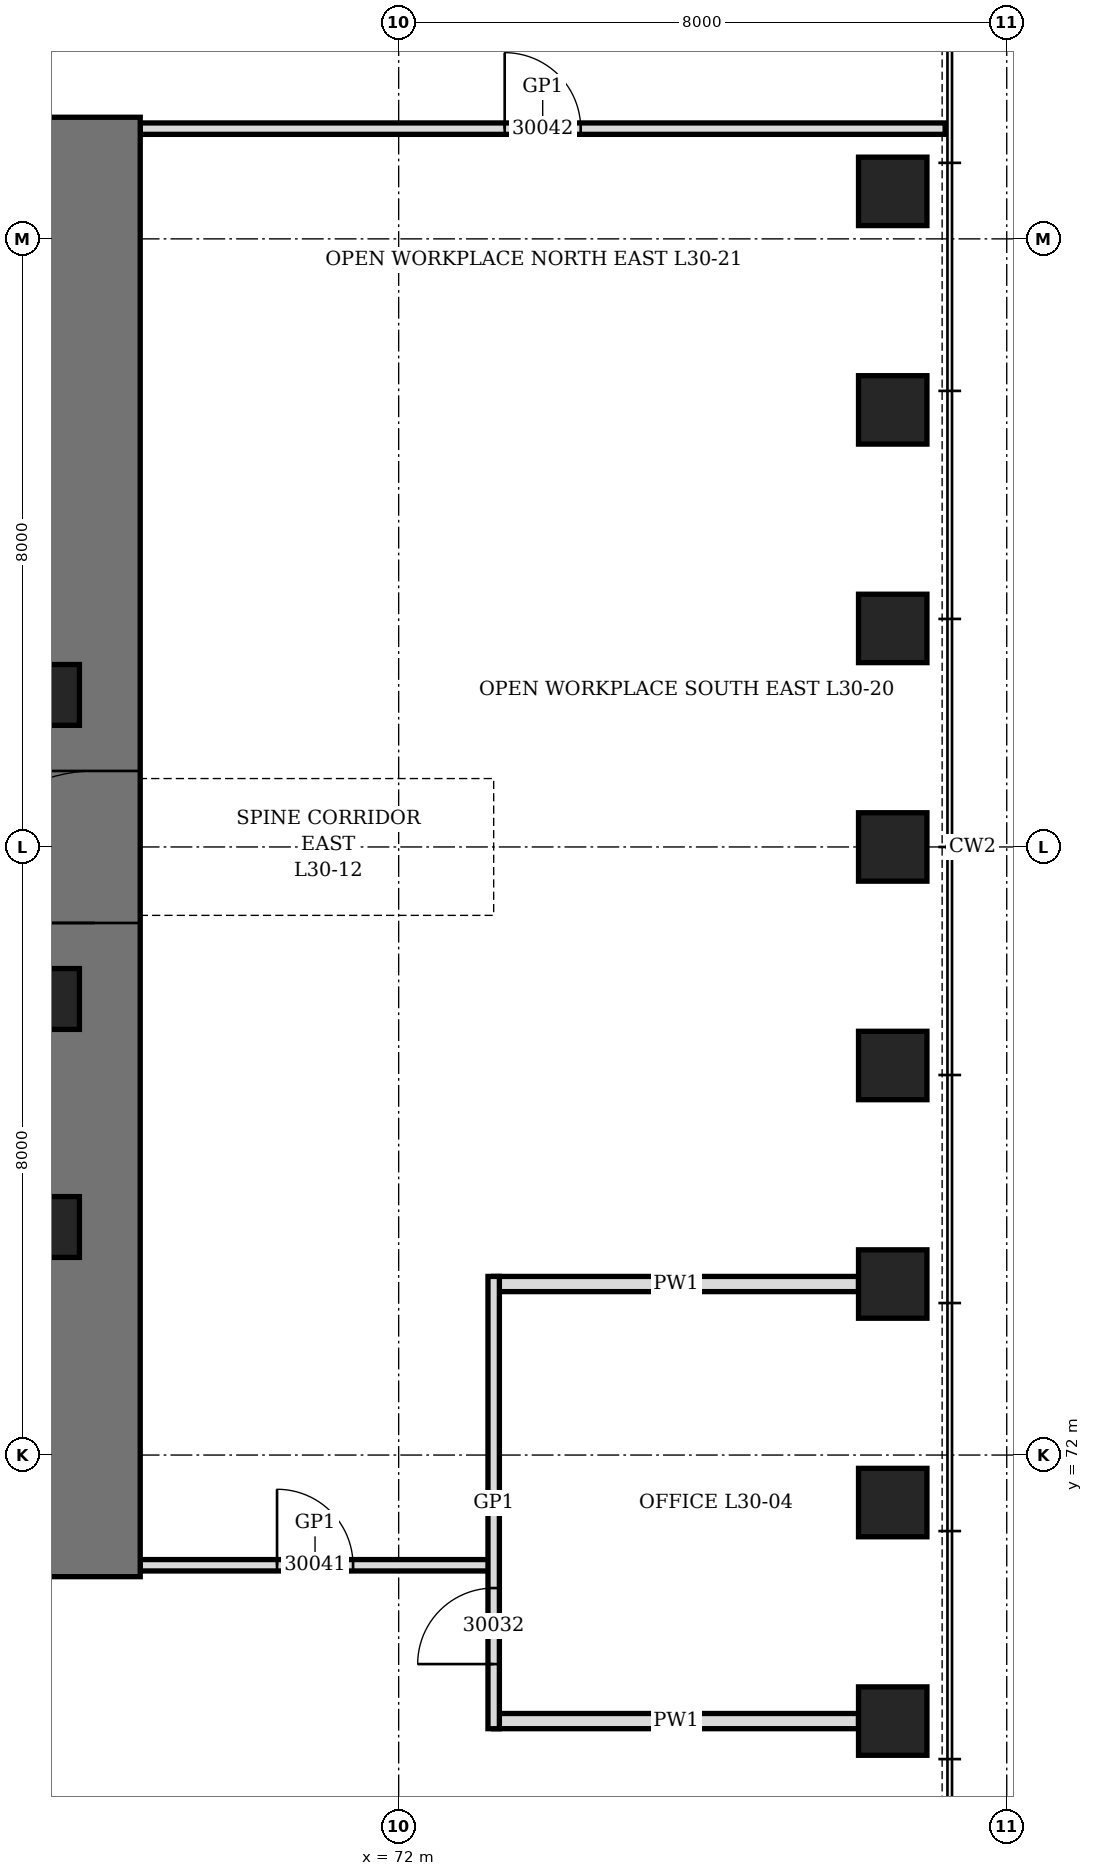
"""IFC4 building model, lengths in metres.
Left out: names, types, materials, properties, quantities, classifications, styles, units other than length and angle.
Written with IfcOpenShell. Run it as: python <this file> out.ifc"""

import sys

from ifc_helpers import new_model, si_unit, direction, frame, frame_2d, origin, origin_2d, place, context, subcontext, project, spatial, rectangle, hollow_rectangle, extrude, element, fill, save


model = new_model("IFC4")
c1 = context("Model", 3, precision=1e-05, world=origin(), true_north=direction((0.0, 1.0)))
c2 = subcontext(c1, "Body", "Model", "MODEL_VIEW")
j1 = project(units=[si_unit("LENGTHUNIT", "METRE"), si_unit("PLANEANGLEUNIT", "RADIAN")], contexts=[c1])
p1 = place(None, origin())
s1 = spatial("IfcSite", under=j1, at=p1, CompositionType="ELEMENT")
p2 = place(p1, origin())
s2 = spatial("IfcBuilding", under=s1, at=p2, CompositionType="ELEMENT")
p3 = place(p2, frame((0.0, 0.0, 137.5)))
s3 = spatial("IfcBuildingStorey", under=s2, at=p3, CompositionType="ELEMENT", Elevation=137.5)
for number, where, z_axis, x_axis in (
    (1, (78.5, 68.5, 0.0), (0.0, 0.0, 1.0), (0.0, 1.0, 0.0)),
    (2, (78.5, 71.375, 0.0), (0.0, 0.0, 1.0), (0.0, 1.0, 0.0)),
    (3, (78.5, 74.25, 0.0), (0.0, 0.0, 1.0), (0.0, 1.0, 0.0)),
    (4, (78.5, 77.125, 0.0), (0.0, 0.0, 1.0), (0.0, 1.0, 0.0)),
    (5, (78.5, 80.0, 0.0), (0.0, 0.0, 1.0), (0.0, 1.0, 0.0)),
    (6, (78.5, 82.875, 0.0), (0.0, 0.0, 1.0), (0.0, 1.0, 0.0)),
    (7, (78.5, 85.75, 0.0), (0.0, 0.0, 1.0), (0.0, 1.0, 0.0)),
    (8, (78.5, 88.625, 0.0), (0.0, 0.0, 1.0), (0.0, 1.0, 0.0)),
):
    element("IfcColumn", number, at=place(p3, frame(where, z_axis=z_axis, x_axis=x_axis)), inside=s3, PredefinedType="COLUMN", context=c2, shape_type="SweptSolid", body=[
        extrude(hollow_rectangle(XDim=0.9, YDim=0.9, WallThickness=0.15, at=origin_2d()), origin(), (0.0, 0.0, 1.0), 4.2),
    ])
p4 = place(p3, frame((68.0, 70.4, 0.0), z_axis=(0.0, 0.0, 1.0), x_axis=(0.0, 1.0, 0.0)))
e9 = element("IfcWall", 9, at=p4, inside=s3, PredefinedType="SHEAR", context=c2, shape_type="SweptSolid", body=[
    extrude(rectangle(XDim=19.2, YDim=1.2, at=frame_2d((9.6, 0.0))), origin(), (0.0, 0.0, 1.0), 4.2),
])
p5 = place(p4, frame((8.6, 0.0, 0.0)))
e10 = element("IfcOpeningElement", 10, at=p5, cuts=e9, PredefinedType="OPENING", context=c2, shape_type="SweptSolid", body=[
    extrude(rectangle(XDim=2.0, YDim=2.4, at=frame_2d((1.0, 1.2))), frame((0.0, 0.61, 0.0), z_axis=(0.0, -1.0, 0.0), x_axis=(1.0, 0.0, 0.0)), (0.0, 0.0, 1.0), 1.22),
])
for number, where, z_axis, x_axis in (
    (11, (67.4, 75.0, 0.0), (0.0, 0.0, 1.0), (1.0, 0.0, 0.0)),
    (12, (67.4, 78.0, 0.0), (0.0, 0.0, 1.0), (1.0, 0.0, 0.0)),
    (13, (67.4, 82.0, 0.0), (0.0, 0.0, 1.0), (1.0, 0.0, 0.0)),
):
    element("IfcColumn", number, at=place(p3, frame(where, z_axis=z_axis, x_axis=x_axis)), inside=s3, PredefinedType="COLUMN", context=c2, shape_type="SweptSolid", body=[
        extrude(hollow_rectangle(XDim=0.8, YDim=0.8, WallThickness=0.1, at=origin_2d()), origin(), (0.0, 0.0, 1.0), 4.2),
    ])
for number, where, z_axis, x_axis in (
    (14, (73.25, 68.5, 0.0), (0.0, 0.0, 1.0), (1.0, 0.0, 0.0)),
    (15, (73.25, 74.25, 0.0), (0.0, 0.0, 1.0), (1.0, 0.0, 0.0)),
):
    element("IfcWall", number, at=place(p3, frame(where, z_axis=z_axis, x_axis=x_axis)), inside=s3, PredefinedType="PARTITIONING", context=c2, shape_type="SweptSolid", body=[
        extrude(rectangle(XDim=4.8, YDim=0.2, at=frame_2d((2.4, 0.0))), origin(), (0.0, 0.0, 1.0), 3.428),
    ])
p6 = place(p3, frame((68.6, 70.55, 0.0), z_axis=(0.0, 0.0, 1.0), x_axis=(1.0, 0.0, 0.0)))
e16 = element("IfcWall", 16, at=p6, inside=s3, PredefinedType="PARTITIONING", context=c2, shape_type="SweptSolid", body=[
    extrude(rectangle(XDim=4.6, YDim=0.15, at=frame_2d((2.3, 0.0))), origin(), (0.0, 0.0, 1.0), 4.04),
])
p7 = place(p6, frame((1.8, 0.0, 0.0)))
e17 = element("IfcOpeningElement", 17, at=p7, cuts=e16, PredefinedType="OPENING", context=c2, shape_type="SweptSolid", body=[
    extrude(rectangle(XDim=1.0, YDim=2.4, at=frame_2d((0.5, 1.2))), frame((0.0, 0.085, 0.0), z_axis=(0.0, -1.0, 0.0), x_axis=(1.0, 0.0, 0.0)), (0.0, 0.0, 1.0), 0.17),
])
p8 = place(p3, frame((68.6, 89.45, 0.0), z_axis=(0.0, 0.0, 1.0), x_axis=(1.0, 0.0, 0.0)))
e18 = element("IfcWall", 18, at=p8, inside=s3, PredefinedType="PARTITIONING", context=c2, shape_type="SweptSolid", body=[
    extrude(rectangle(XDim=10.59, YDim=0.15, at=frame_2d((5.295, 0.0))), origin(), (0.0, 0.0, 1.0), 4.04),
])
p9 = place(p8, frame((4.795, 0.0, 0.0)))
e19 = element("IfcOpeningElement", 19, at=p9, cuts=e18, PredefinedType="OPENING", context=c2, shape_type="SweptSolid", body=[
    extrude(rectangle(XDim=1.0, YDim=2.4, at=frame_2d((0.5, 1.2))), frame((0.0, 0.085, 0.0), z_axis=(0.0, -1.0, 0.0), x_axis=(1.0, 0.0, 0.0)), (0.0, 0.0, 1.0), 0.17),
])
p10 = place(p3, frame((73.25, 68.4, 0.0), z_axis=(0.0, 0.0, 1.0), x_axis=(0.0, 1.0, 0.0)))
e20 = element("IfcWall", 20, at=p10, inside=s3, PredefinedType="PARTITIONING", context=c2, shape_type="SweptSolid", body=[
    extrude(rectangle(XDim=5.95, YDim=0.15, at=frame_2d((2.975, 0.0))), origin(), (0.0, 0.0, 1.0), 4.04),
])
p11 = place(p10, frame((0.85, 0.0, 0.0)))
e21 = element("IfcOpeningElement", 21, at=p11, cuts=e20, PredefinedType="OPENING", context=c2, shape_type="SweptSolid", body=[
    extrude(rectangle(XDim=1.0, YDim=2.1, at=frame_2d((0.5, 1.05))), frame((0.0, 0.085, 0.0), z_axis=(0.0, -1.0, 0.0), x_axis=(1.0, 0.0, 0.0)), (0.0, 0.0, 1.0), 0.17),
])
p12 = place(p5, origin())
e22 = element("IfcDoor", 22, at=p12, inside=s3, OperationType="DOUBLE_DOOR_SINGLE_SWING", PredefinedType="DOOR", context=c2, shape_type="SweptSolid", body=[
    extrude(rectangle(XDim=2.0, YDim=2.4, at=frame_2d((1.0, 1.2))), frame((0.0, 0.35, 0.0), z_axis=(0.0, -1.0, 0.0), x_axis=(1.0, 0.0, 0.0)), (0.0, 0.0, 1.0), 0.7),
])
fill(e10, e22)
p13 = place(p11, origin())
e23 = element("IfcDoor", 23, at=p13, inside=s3, OperationType="SINGLE_SWING_LEFT", PredefinedType="DOOR", context=c2, shape_type="SweptSolid", body=[
    extrude(rectangle(XDim=1.0, YDim=2.1, at=frame_2d((0.5, 1.05))), frame((0.0, 0.075, 0.0), z_axis=(0.0, -1.0, 0.0), x_axis=(1.0, 0.0, 0.0)), (0.0, 0.0, 1.0), 0.149),
])
fill(e21, e23)
p14 = place(p7, origin())
e24 = element("IfcDoor", 24, at=p14, inside=s3, OperationType="SINGLE_SWING_RIGHT", PredefinedType="DOOR", context=c2, shape_type="SweptSolid", body=[
    extrude(rectangle(XDim=1.0, YDim=2.4, at=frame_2d((0.5, 1.2))), frame((0.0, 0.075, 0.0), z_axis=(0.0, -1.0, 0.0), x_axis=(1.0, 0.0, 0.0)), (0.0, 0.0, 1.0), 0.149),
])
fill(e17, e24)
p15 = place(p9, origin())
e25 = element("IfcDoor", 25, at=p15, inside=s3, OperationType="SINGLE_SWING_RIGHT", PredefinedType="DOOR", context=c2, shape_type="SweptSolid", body=[
    extrude(rectangle(XDim=1.0, YDim=2.4, at=frame_2d((0.5, 1.2))), frame((0.0, 0.075, 0.0), z_axis=(0.0, -1.0, 0.0), x_axis=(1.0, 0.0, 0.0)), (0.0, 0.0, 1.0), 0.149),
])
fill(e19, e25)
save(model, sys.argv[1])
